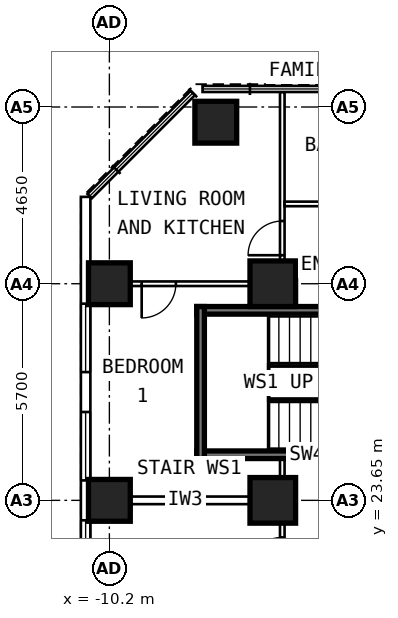
"""IFC4 building model, lengths in metres.
Left out: names, types, materials, properties, quantities, classifications, styles, units other than length and angle.
Written with IfcOpenShell. Run it as: python <this file> out.ifc"""

import sys

from ifc_helpers import new_model, si_unit, direction, frame, frame_2d, origin, origin_2d, place, context, subcontext, project, spatial, rectangle, extrude, element, fill, save


model = new_model("IFC4")
c1 = context("Model", 3, precision=1e-05, world=origin(), true_north=direction((0.0, 1.0)))
c2 = subcontext(c1, "Body", "Model", "MODEL_VIEW")
j1 = project(units=[si_unit("LENGTHUNIT", "METRE"), si_unit("PLANEANGLEUNIT", "RADIAN")], contexts=[c1])
p1 = place(None, origin())
s1 = spatial("IfcSite", under=j1, at=p1, CompositionType="ELEMENT")
p2 = place(p1, origin())
s2 = spatial("IfcBuilding", under=s1, at=p2, CompositionType="ELEMENT")
p3 = place(p2, frame((0.0, 0.0, 28.8)))
s3 = spatial("IfcBuildingStorey", under=s2, at=p3, CompositionType="ELEMENT", Elevation=28.8)
for number, where, z_axis, x_axis in (
    (1, (-10.2, 23.65, 0.0), (0.0, 0.0, 1.0), (0.0, 1.0, 0.0)),
    (2, (-10.2, 29.35, 0.0), (0.0, 0.0, 1.0), (0.0, 1.0, 0.0)),
    (3, (-7.4, 33.6, 0.0), (0.0, 0.0, 1.0), (0.0, 1.0, 0.0)),
):
    element("IfcColumn", number, at=place(p3, frame(where, z_axis=z_axis, x_axis=x_axis)), inside=s3, PredefinedType="COLUMN", context=c2, shape_type="SweptSolid", body=[
        extrude(rectangle(XDim=1.1, YDim=1.1, at=origin_2d()), origin(), (0.0, 0.0, 1.0), 3.6),
    ])
for number, where, z_axis, x_axis in (
    (4, (-5.9, 23.65, 0.0), (0.0, 0.0, 1.0), (0.0, 1.0, 0.0)),
    (5, (-5.9, 29.35, 0.0), (0.0, 0.0, 1.0), (0.0, 1.0, 0.0)),
):
    element("IfcColumn", number, at=place(p3, frame(where, z_axis=z_axis, x_axis=x_axis)), inside=s3, PredefinedType="COLUMN", context=c2, shape_type="SweptSolid", body=[
        extrude(rectangle(XDim=1.2, YDim=1.2, at=origin_2d()), origin(), (0.0, 0.0, 1.0), 3.6),
    ])
p4 = place(p3, frame((-10.825, 6.409, 0.0), z_axis=(0.0, 0.0, 1.0), x_axis=(0.0, 1.0, 0.0)))
e6 = element("IfcWall", 6, at=p4, inside=s3, PredefinedType="SOLIDWALL", context=c2, shape_type="SweptSolid", body=[
    extrude(rectangle(XDim=25.226, YDim=0.25, at=frame_2d((12.613, 0.0))), origin(), (0.0, 0.0, 1.0), 3.3),
])
p5 = place(p4, frame((0.666, 0.0, 0.8)))
e7 = element("IfcOpeningElement", 7, at=p5, cuts=e6, PredefinedType="OPENING", context=c2, shape_type="SweptSolid", body=[
    extrude(rectangle(XDim=1.8, YDim=1.8, at=frame_2d((0.9, 0.9))), frame((0.0, 0.137, 0.0), z_axis=(0.0, -1.0, 0.0), x_axis=(1.0, 0.0, 0.0)), (0.0, 0.0, 1.0), 0.274),
])
p6 = place(p4, frame((3.516, 0.0, 0.8)))
e8 = element("IfcOpeningElement", 8, at=p6, cuts=e6, PredefinedType="OPENING", context=c2, shape_type="SweptSolid", body=[
    extrude(rectangle(XDim=1.8, YDim=1.8, at=frame_2d((0.9, 0.9))), frame((0.0, 0.137, 0.0), z_axis=(0.0, -1.0, 0.0), x_axis=(1.0, 0.0, 0.0)), (0.0, 0.0, 1.0), 0.274),
])
p7 = place(p4, frame((6.366, 0.0, 0.8)))
e9 = element("IfcOpeningElement", 9, at=p7, cuts=e6, PredefinedType="OPENING", context=c2, shape_type="SweptSolid", body=[
    extrude(rectangle(XDim=1.8, YDim=1.8, at=frame_2d((0.9, 0.9))), frame((0.0, 0.137, 0.0), z_axis=(0.0, -1.0, 0.0), x_axis=(1.0, 0.0, 0.0)), (0.0, 0.0, 1.0), 0.274),
])
p8 = place(p4, frame((9.216, 0.0, 0.8)))
e10 = element("IfcOpeningElement", 10, at=p8, cuts=e6, PredefinedType="OPENING", context=c2, shape_type="SweptSolid", body=[
    extrude(rectangle(XDim=1.8, YDim=1.8, at=frame_2d((0.9, 0.9))), frame((0.0, 0.137, 0.0), z_axis=(0.0, -1.0, 0.0), x_axis=(1.0, 0.0, 0.0)), (0.0, 0.0, 1.0), 0.274),
])
p9 = place(p4, frame((12.066, 0.0, 0.8)))
e11 = element("IfcOpeningElement", 11, at=p9, cuts=e6, PredefinedType="OPENING", context=c2, shape_type="SweptSolid", body=[
    extrude(rectangle(XDim=1.8, YDim=1.8, at=frame_2d((0.9, 0.9))), frame((0.0, 0.137, 0.0), z_axis=(0.0, -1.0, 0.0), x_axis=(1.0, 0.0, 0.0)), (0.0, 0.0, 1.0), 0.274),
])
p10 = place(p4, frame((14.916, 0.0, 0.8)))
e12 = element("IfcOpeningElement", 12, at=p10, cuts=e6, PredefinedType="OPENING", context=c2, shape_type="SweptSolid", body=[
    extrude(rectangle(XDim=1.8, YDim=1.8, at=frame_2d((0.9, 0.9))), frame((0.0, 0.137, 0.0), z_axis=(0.0, -1.0, 0.0), x_axis=(1.0, 0.0, 0.0)), (0.0, 0.0, 1.0), 0.274),
])
p11 = place(p4, frame((17.766, 0.0, 0.8)))
e13 = element("IfcOpeningElement", 13, at=p11, cuts=e6, PredefinedType="OPENING", context=c2, shape_type="SweptSolid", body=[
    extrude(rectangle(XDim=1.8, YDim=1.8, at=frame_2d((0.9, 0.9))), frame((0.0, 0.137, 0.0), z_axis=(0.0, -1.0, 0.0), x_axis=(1.0, 0.0, 0.0)), (0.0, 0.0, 1.0), 0.274),
])
p12 = place(p4, frame((20.616, 0.0, 0.8)))
e14 = element("IfcOpeningElement", 14, at=p12, cuts=e6, PredefinedType="OPENING", context=c2, shape_type="SweptSolid", body=[
    extrude(rectangle(XDim=1.8, YDim=1.8, at=frame_2d((0.9, 0.9))), frame((0.0, 0.137, 0.0), z_axis=(0.0, -1.0, 0.0), x_axis=(1.0, 0.0, 0.0)), (0.0, 0.0, 1.0), 0.274),
])
p13 = place(p3, frame((-5.65, 9.6, 0.0), z_axis=(0.0, 0.0, 1.0), x_axis=(0.0, 1.0, 0.0)))
e15 = element("IfcWall", 15, at=p13, inside=s3, PredefinedType="PARTITIONING", context=c2, shape_type="SweptSolid", body=[
    extrude(rectangle(XDim=15.15, YDim=0.12, at=frame_2d((7.575, 0.0))), origin(), (0.0, 0.0, 1.0), 3.3),
])
p14 = place(p13, frame((5.05, 0.0, 0.0)))
e16 = element("IfcOpeningElement", 16, at=p14, cuts=e15, PredefinedType="OPENING", context=c2, shape_type="SweptSolid", body=[
    extrude(rectangle(XDim=0.9, YDim=2.1, at=frame_2d((0.45, 1.05))), frame((0.0, 0.072, 0.0), z_axis=(0.0, -1.0, 0.0), x_axis=(1.0, 0.0, 0.0)), (0.0, 0.0, 1.0), 0.144),
])
p15 = place(p13, frame((9.325, 0.0, 0.0)))
e17 = element("IfcOpeningElement", 17, at=p15, cuts=e15, PredefinedType="OPENING", context=c2, shape_type="SweptSolid", body=[
    extrude(rectangle(XDim=0.9, YDim=2.1, at=frame_2d((0.45, 1.05))), frame((0.0, 0.072, 0.0), z_axis=(0.0, -1.0, 0.0), x_axis=(1.0, 0.0, 0.0)), (0.0, 0.0, 1.0), 0.144),
])
p16 = place(p13, frame((12.175, 0.0, 0.0)))
e18 = element("IfcOpeningElement", 18, at=p16, cuts=e15, PredefinedType="OPENING", context=c2, shape_type="SweptSolid", body=[
    extrude(rectangle(XDim=0.9, YDim=2.1, at=frame_2d((0.45, 1.05))), frame((0.0, 0.072, 0.0), z_axis=(0.0, -1.0, 0.0), x_axis=(1.0, 0.0, 0.0)), (0.0, 0.0, 1.0), 0.144),
])
p17 = place(p3, frame((-5.71, 23.65, 0.0), z_axis=(0.0, 0.0, 1.0), x_axis=(-1.0, 0.0, 0.0)))
e19 = element("IfcWall", 19, at=p17, inside=s3, PredefinedType="PARTITIONING", context=c2, shape_type="SweptSolid", body=[
    extrude(rectangle(XDim=4.99, YDim=0.2, at=frame_2d((2.495, 0.0))), origin(), (0.0, 0.0, 1.0), 3.3),
])
p18 = place(p3, frame((-5.71, 29.35, 0.0), z_axis=(0.0, 0.0, 1.0), x_axis=(-1.0, 0.0, 0.0)))
e20 = element("IfcWall", 20, at=p18, inside=s3, PredefinedType="PARTITIONING", context=c2, shape_type="SweptSolid", body=[
    extrude(rectangle(XDim=4.99, YDim=0.12, at=frame_2d((2.495, 0.0))), origin(), (0.0, 0.0, 1.0), 2.3),
])
p19 = place(p18, frame((2.74, 0.0, 0.0)))
e21 = element("IfcOpeningElement", 21, at=p19, cuts=e20, PredefinedType="OPENING", context=c2, shape_type="SweptSolid", body=[
    extrude(rectangle(XDim=0.9, YDim=2.1, at=frame_2d((0.45, 1.05))), frame((0.0, 0.072, 0.0), z_axis=(0.0, -1.0, 0.0), x_axis=(1.0, 0.0, 0.0)), (0.0, 0.0, 1.0), 0.144),
])
p20 = place(p3, frame((-5.65, 28.95, 0.0), z_axis=(0.0, 0.0, 1.0), x_axis=(0.0, 1.0, 0.0)))
e22 = element("IfcWall", 22, at=p20, inside=s3, PredefinedType="PARTITIONING", context=c2, shape_type="SweptSolid", body=[
    extrude(rectangle(XDim=5.445, YDim=0.12, at=frame_2d((2.723, 0.0))), origin(), (0.0, 0.0, 1.0), 3.3),
])
p21 = place(p20, frame((1.15, 0.0, 0.0)))
e23 = element("IfcOpeningElement", 23, at=p21, cuts=e22, PredefinedType="OPENING", context=c2, shape_type="SweptSolid", body=[
    extrude(rectangle(XDim=0.9, YDim=2.1, at=frame_2d((0.45, 1.05))), frame((0.0, 0.072, 0.0), z_axis=(0.0, -1.0, 0.0), x_axis=(1.0, 0.0, 0.0)), (0.0, 0.0, 1.0), 0.144),
])
p22 = place(p3, frame((-2.1, 31.45, 0.0), z_axis=(0.0, 0.0, 1.0), x_axis=(-1.0, 0.0, 0.0)))
e24 = element("IfcWall", 24, at=p22, inside=s3, PredefinedType="PARTITIONING", context=c2, shape_type="SweptSolid", body=[
    extrude(rectangle(XDim=3.49, YDim=0.12, at=frame_2d((1.745, 0.0))), origin(), (0.0, 0.0, 1.0), 3.3),
])
p23 = place(p22, frame((1.345, 0.0, 0.0)))
e25 = element("IfcOpeningElement", 25, at=p23, cuts=e24, PredefinedType="OPENING", context=c2, shape_type="SweptSolid", body=[
    extrude(rectangle(XDim=0.8, YDim=2.1, at=frame_2d((0.4, 1.05))), frame((0.0, 0.072, 0.0), z_axis=(0.0, -1.0, 0.0), x_axis=(1.0, 0.0, 0.0)), (0.0, 0.0, 1.0), 0.144),
])
for number, where, z_axis, x_axis in (
    (26, (-2.1, 24.85, 0.0), (0.0, 0.0, 1.0), (-1.0, 0.0, 0.0)),
    (27, (-2.1, 28.65, 0.0), (0.0, 0.0, 1.0), (-1.0, 0.0, 0.0)),
):
    element("IfcWall", number, at=place(p3, frame(where, z_axis=z_axis, x_axis=x_axis)), inside=s3, PredefinedType="SHEAR", context=c2, shape_type="SweptSolid", body=[
        extrude(rectangle(XDim=5.8, YDim=0.2, at=frame_2d((2.9, 0.0))), origin(), (0.0, 0.0, 1.0), 3.28),
    ])
p24 = place(p3, frame((-7.8, 24.75, 0.0), z_axis=(0.0, 0.0, 1.0), x_axis=(0.0, 1.0, 0.0)))
e28 = element("IfcWall", 28, at=p24, inside=s3, PredefinedType="SHEAR", context=c2, shape_type="SweptSolid", body=[
    extrude(rectangle(XDim=4.0, YDim=0.2, at=frame_2d((2.0, 0.0))), origin(), (0.0, 0.0, 1.0), 3.28),
])
p25 = place(p10, origin())
e29 = element("IfcWindow", 29, at=p25, inside=s3, PartitioningType="SINGLE_PANEL", PredefinedType="WINDOW", context=c2, shape_type="SweptSolid", body=[
    extrude(rectangle(XDim=1.8, YDim=1.8, at=frame_2d((0.9, 0.9))), frame((0.0, 0.03, 0.0), z_axis=(0.0, -1.0, 0.0), x_axis=(1.0, 0.0, 0.0)), (0.0, 0.0, 1.0), 0.06),
])
fill(e12, e29)
p26 = place(p11, origin())
e30 = element("IfcWindow", 30, at=p26, inside=s3, PartitioningType="SINGLE_PANEL", PredefinedType="WINDOW", context=c2, shape_type="SweptSolid", body=[
    extrude(rectangle(XDim=1.8, YDim=1.8, at=frame_2d((0.9, 0.9))), frame((0.0, 0.03, 0.0), z_axis=(0.0, -1.0, 0.0), x_axis=(1.0, 0.0, 0.0)), (0.0, 0.0, 1.0), 0.06),
])
fill(e13, e30)
p27 = place(p12, origin())
e31 = element("IfcWindow", 31, at=p27, inside=s3, PartitioningType="SINGLE_PANEL", PredefinedType="WINDOW", context=c2, shape_type="SweptSolid", body=[
    extrude(rectangle(XDim=1.8, YDim=1.8, at=frame_2d((0.9, 0.9))), frame((0.0, 0.03, 0.0), z_axis=(0.0, -1.0, 0.0), x_axis=(1.0, 0.0, 0.0)), (0.0, 0.0, 1.0), 0.06),
])
fill(e14, e31)
p28 = place(p16, origin())
e32 = element("IfcDoor", 32, at=p28, inside=s3, OperationType="SINGLE_SWING_LEFT", PredefinedType="DOOR", context=c2, shape_type="SweptSolid", body=[
    extrude(rectangle(XDim=0.9, YDim=2.1, at=frame_2d((0.45, 1.05))), frame((0.0, 0.025, 0.0), z_axis=(0.0, -1.0, 0.0), x_axis=(1.0, 0.0, 0.0)), (0.0, 0.0, 1.0), 0.05),
])
fill(e18, e32)
p29 = place(p19, origin())
e33 = element("IfcDoor", 33, at=p29, inside=s3, OperationType="SINGLE_SWING_RIGHT", PredefinedType="DOOR", context=c2, shape_type="SweptSolid", body=[
    extrude(rectangle(XDim=0.9, YDim=2.1, at=frame_2d((0.45, 1.05))), frame((0.0, 0.025, 0.0), z_axis=(0.0, -1.0, 0.0), x_axis=(1.0, 0.0, 0.0)), (0.0, 0.0, 1.0), 0.05),
])
fill(e21, e33)
p30 = place(p21, origin())
e34 = element("IfcDoor", 34, at=p30, inside=s3, OperationType="SINGLE_SWING_LEFT", PredefinedType="DOOR", context=c2, shape_type="SweptSolid", body=[
    extrude(rectangle(XDim=0.9, YDim=2.1, at=frame_2d((0.45, 1.05))), frame((0.0, 0.025, 0.0), z_axis=(0.0, -1.0, 0.0), x_axis=(1.0, 0.0, 0.0)), (0.0, 0.0, 1.0), 0.05),
])
fill(e23, e34)
save(model, sys.argv[1])
